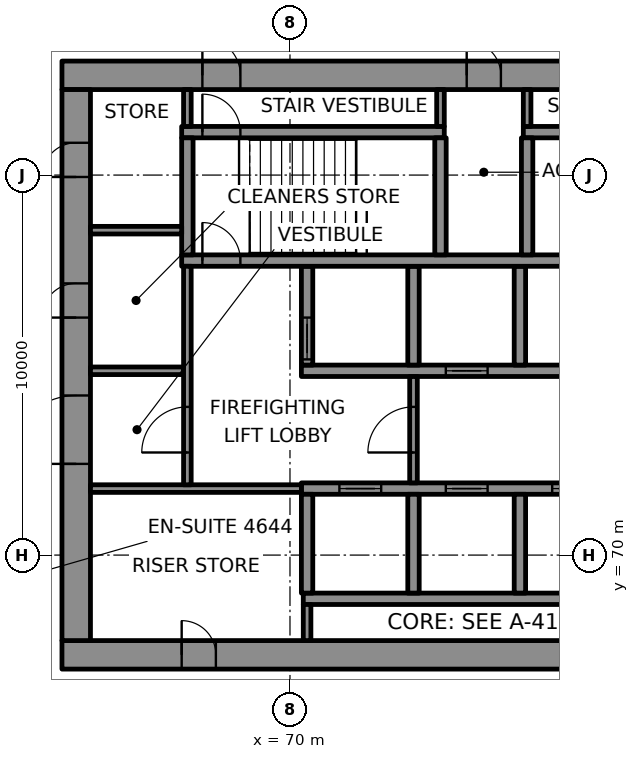
"""IFC4 building model, lengths in metres.
Left out: names, types, materials, properties, quantities, classifications, styles, units other than length and angle.
Written with IfcOpenShell. Run it as: python <this file> out.ifc"""

import sys

from ifc_helpers import new_model, si_unit, direction, frame, frame_2d, origin, place, context, subcontext, project, spatial, rectangle, extrude, element, fill, save


model = new_model("IFC4")
c1 = context("Model", 3, precision=1e-05, world=origin(), true_north=direction((0.0, 1.0)))
c2 = subcontext(c1, "Body", "Model", "MODEL_VIEW")
j1 = project(units=[si_unit("LENGTHUNIT", "METRE"), si_unit("PLANEANGLEUNIT", "RADIAN")], contexts=[c1])
p1 = place(None, origin())
s1 = spatial("IfcSite", under=j1, at=p1, CompositionType="ELEMENT")
p2 = place(p1, origin())
s2 = spatial("IfcBuilding", under=s1, at=p2, CompositionType="ELEMENT")
p3 = place(p2, frame((0.0, 0.0, 198.7)))
s3 = spatial("IfcBuildingStorey", under=s2, at=p3, CompositionType="ELEMENT", Elevation=198.7)
p4 = place(p3, frame((64.0, 67.375, 0.0), z_axis=(0.0, 0.0, 1.0), x_axis=(1.0, 0.0, 0.0)))
e1 = element("IfcWall", 1, at=p4, inside=s3, PredefinedType="SHEAR", context=c2, shape_type="SweptSolid", body=[
    extrude(rectangle(XDim=22.0, YDim=0.75, at=frame_2d((11.0, 0.0))), origin(), (0.0, 0.0, 1.0), 3.7),
])
p5 = place(p4, frame((3.15, 0.0, 0.0)))
e2 = element("IfcOpeningElement", 2, at=p5, cuts=e1, PredefinedType="OPENING", context=c2, shape_type="SweptSolid", body=[
    extrude(rectangle(XDim=0.9, YDim=2.1, at=frame_2d((0.45, 1.05))), frame((0.0, 0.385, 0.0), z_axis=(0.0, -1.0, 0.0), x_axis=(1.0, 0.0, 0.0)), (0.0, 0.0, 1.0), 0.77),
])
p6 = place(p3, frame((64.0, 82.625, 0.0), z_axis=(0.0, 0.0, 1.0), x_axis=(1.0, 0.0, 0.0)))
e3 = element("IfcWall", 3, at=p6, inside=s3, PredefinedType="SHEAR", context=c2, shape_type="SweptSolid", body=[
    extrude(rectangle(XDim=22.0, YDim=0.75, at=frame_2d((11.0, 0.0))), origin(), (0.0, 0.0, 1.0), 3.7),
])
p7 = place(p6, frame((3.695, 0.0, 0.0)))
e4 = element("IfcOpeningElement", 4, at=p7, cuts=e3, PredefinedType="OPENING", context=c2, shape_type="SweptSolid", body=[
    extrude(rectangle(XDim=1.0, YDim=2.1, at=frame_2d((0.5, 1.05))), frame((0.0, 0.385, 0.0), z_axis=(0.0, -1.0, 0.0), x_axis=(1.0, 0.0, 0.0)), (0.0, 0.0, 1.0), 0.77),
])
p8 = place(p6, frame((17.505, 0.0, 0.0)))
e5 = element("IfcOpeningElement", 5, at=p8, cuts=e3, PredefinedType="OPENING", context=c2, shape_type="SweptSolid", body=[
    extrude(rectangle(XDim=1.0, YDim=2.1, at=frame_2d((0.5, 1.05))), frame((0.0, 0.385, 0.0), z_axis=(0.0, -1.0, 0.0), x_axis=(1.0, 0.0, 0.0)), (0.0, 0.0, 1.0), 0.77),
])
p9 = place(p6, frame((10.65, 0.0, 0.0)))
e6 = element("IfcOpeningElement", 6, at=p9, cuts=e3, PredefinedType="OPENING", context=c2, shape_type="SweptSolid", body=[
    extrude(rectangle(XDim=0.9, YDim=2.1, at=frame_2d((0.45, 1.05))), frame((0.0, 0.385, 0.0), z_axis=(0.0, -1.0, 0.0), x_axis=(1.0, 0.0, 0.0)), (0.0, 0.0, 1.0), 0.77),
])
p10 = place(p3, frame((64.375, 67.75, 0.0), z_axis=(0.0, 0.0, 1.0), x_axis=(0.0, 1.0, 0.0)))
e7 = element("IfcWall", 7, at=p10, inside=s3, PredefinedType="SHEAR", context=c2, shape_type="SweptSolid", body=[
    extrude(rectangle(XDim=14.5, YDim=0.75, at=frame_2d((7.25, 0.0))), origin(), (0.0, 0.0, 1.0), 3.7),
])
p11 = place(p10, frame((4.65, 0.0, 0.0)))
e8 = element("IfcOpeningElement", 8, at=p11, cuts=e7, PredefinedType="OPENING", context=c2, shape_type="SweptSolid", body=[
    extrude(rectangle(XDim=1.8, YDim=2.1, at=frame_2d((0.9, 1.05))), frame((0.0, 0.385, 0.0), z_axis=(0.0, -1.0, 0.0), x_axis=(1.0, 0.0, 0.0)), (0.0, 0.0, 1.0), 0.77),
])
p12 = place(p10, frame((8.5, 0.0, 0.0)))
e9 = element("IfcOpeningElement", 9, at=p12, cuts=e7, PredefinedType="OPENING", context=c2, shape_type="SweptSolid", body=[
    extrude(rectangle(XDim=0.9, YDim=2.1, at=frame_2d((0.45, 1.05))), frame((0.0, 0.385, 0.0), z_axis=(0.0, -1.0, 0.0), x_axis=(1.0, 0.0, 0.0)), (0.0, 0.0, 1.0), 0.77),
])
p13 = place(p10, frame((12.2, 0.0, 0.0)))
e10 = element("IfcOpeningElement", 10, at=p13, cuts=e7, PredefinedType="OPENING", context=c2, shape_type="SweptSolid", body=[
    extrude(rectangle(XDim=0.9, YDim=2.1, at=frame_2d((0.45, 1.05))), frame((0.0, 0.385, 0.0), z_axis=(0.0, -1.0, 0.0), x_axis=(1.0, 0.0, 0.0)), (0.0, 0.0, 1.0), 0.77),
])
p14 = place(p3, frame((70.35, 68.85, 0.0), z_axis=(0.0, 0.0, 1.0), x_axis=(1.0, 0.0, 0.0)))
e11 = element("IfcWall", 11, at=p14, inside=s3, PredefinedType="SHEAR", context=c2, shape_type="SweptSolid", body=[
    extrude(rectangle(XDim=14.2, YDim=0.3, at=frame_2d((7.1, 0.0))), origin(), (0.0, 0.0, 1.0), 3.7),
])
p15 = place(p3, frame((70.3, 71.75, 0.0), z_axis=(0.0, 0.0, 1.0), x_axis=(1.0, 0.0, 0.0)))
e12 = element("IfcWall", 12, at=p15, inside=s3, PredefinedType="SHEAR", context=c2, shape_type="SweptSolid", body=[
    extrude(rectangle(XDim=14.3, YDim=0.3, at=frame_2d((7.15, 0.0))), origin(), (0.0, 0.0, 1.0), 3.7),
])
p16 = place(p15, frame((1.0, 0.0, 0.0)))
e13 = element("IfcOpeningElement", 13, at=p16, cuts=e12, PredefinedType="OPENING", context=c2, shape_type="SweptSolid", body=[
    extrude(rectangle(XDim=1.1, YDim=2.1, at=frame_2d((0.55, 1.05))), frame((0.0, 0.16, 0.0), z_axis=(0.0, -1.0, 0.0), x_axis=(1.0, 0.0, 0.0)), (0.0, 0.0, 1.0), 0.32),
])
p17 = place(p15, frame((3.8, 0.0, 0.0)))
e14 = element("IfcOpeningElement", 14, at=p17, cuts=e12, PredefinedType="OPENING", context=c2, shape_type="SweptSolid", body=[
    extrude(rectangle(XDim=1.1, YDim=2.1, at=frame_2d((0.55, 1.05))), frame((0.0, 0.16, 0.0), z_axis=(0.0, -1.0, 0.0), x_axis=(1.0, 0.0, 0.0)), (0.0, 0.0, 1.0), 0.32),
])
p18 = place(p15, frame((6.6, 0.0, 0.0)))
e15 = element("IfcOpeningElement", 15, at=p18, cuts=e12, PredefinedType="OPENING", context=c2, shape_type="SweptSolid", body=[
    extrude(rectangle(XDim=1.1, YDim=2.1, at=frame_2d((0.55, 1.05))), frame((0.0, 0.16, 0.0), z_axis=(0.0, -1.0, 0.0), x_axis=(1.0, 0.0, 0.0)), (0.0, 0.0, 1.0), 0.32),
])
p19 = place(p15, frame((9.4, 0.0, 0.0)))
e16 = element("IfcOpeningElement", 16, at=p19, cuts=e12, PredefinedType="OPENING", context=c2, shape_type="SweptSolid", body=[
    extrude(rectangle(XDim=1.1, YDim=2.1, at=frame_2d((0.55, 1.05))), frame((0.0, 0.16, 0.0), z_axis=(0.0, -1.0, 0.0), x_axis=(1.0, 0.0, 0.0)), (0.0, 0.0, 1.0), 0.32),
])
p20 = place(p15, frame((12.2, 0.0, 0.0)))
e17 = element("IfcOpeningElement", 17, at=p20, cuts=e12, PredefinedType="OPENING", context=c2, shape_type="SweptSolid", body=[
    extrude(rectangle(XDim=1.1, YDim=2.1, at=frame_2d((0.55, 1.05))), frame((0.0, 0.16, 0.0), z_axis=(0.0, -1.0, 0.0), x_axis=(1.0, 0.0, 0.0)), (0.0, 0.0, 1.0), 0.32),
])
p21 = place(p3, frame((70.3, 74.85, 0.0), z_axis=(0.0, 0.0, 1.0), x_axis=(1.0, 0.0, 0.0)))
e18 = element("IfcWall", 18, at=p21, inside=s3, PredefinedType="SHEAR", context=c2, shape_type="SweptSolid", body=[
    extrude(rectangle(XDim=14.3, YDim=0.3, at=frame_2d((7.15, 0.0))), origin(), (0.0, 0.0, 1.0), 3.7),
])
p22 = place(p21, frame((3.8, 0.0, 0.0)))
e19 = element("IfcOpeningElement", 19, at=p22, cuts=e18, PredefinedType="OPENING", context=c2, shape_type="SweptSolid", body=[
    extrude(rectangle(XDim=1.1, YDim=2.1, at=frame_2d((0.55, 1.05))), frame((0.0, 0.16, 0.0), z_axis=(0.0, -1.0, 0.0), x_axis=(1.0, 0.0, 0.0)), (0.0, 0.0, 1.0), 0.32),
])
p23 = place(p21, frame((12.2, 0.0, 0.0)))
e20 = element("IfcOpeningElement", 20, at=p23, cuts=e18, PredefinedType="OPENING", context=c2, shape_type="SweptSolid", body=[
    extrude(rectangle(XDim=1.1, YDim=2.1, at=frame_2d((0.55, 1.05))), frame((0.0, 0.16, 0.0), z_axis=(0.0, -1.0, 0.0), x_axis=(1.0, 0.0, 0.0)), (0.0, 0.0, 1.0), 0.32),
])
p24 = place(p3, frame((70.45, 69.0, 0.0), z_axis=(0.0, 0.0, 1.0), x_axis=(0.0, 1.0, 0.0)))
e21 = element("IfcWall", 21, at=p24, inside=s3, PredefinedType="SHEAR", context=c2, shape_type="SweptSolid", body=[
    extrude(rectangle(XDim=2.6, YDim=0.3, at=frame_2d((1.3, 0.0))), origin(), (0.0, 0.0, 1.0), 3.7),
])
p25 = place(p3, frame((70.45, 75.0, 0.0), z_axis=(0.0, 0.0, 1.0), x_axis=(0.0, 1.0, 0.0)))
e22 = element("IfcWall", 22, at=p25, inside=s3, PredefinedType="SHEAR", context=c2, shape_type="SweptSolid", body=[
    extrude(rectangle(XDim=2.6, YDim=0.3, at=frame_2d((1.3, 0.0))), origin(), (0.0, 0.0, 1.0), 3.7),
])
p26 = place(p25, frame((0.15, 0.0, 0.0)))
e23 = element("IfcOpeningElement", 23, at=p26, cuts=e22, PredefinedType="OPENING", context=c2, shape_type="SweptSolid", body=[
    extrude(rectangle(XDim=1.1, YDim=2.1, at=frame_2d((0.55, 1.05))), frame((0.0, 0.16, 0.0), z_axis=(0.0, -1.0, 0.0), x_axis=(1.0, 0.0, 0.0)), (0.0, 0.0, 1.0), 0.32),
])
for number, where, z_axis, x_axis in (
    (24, (73.25, 69.0, 0.0), (0.0, 0.0, 1.0), (0.0, 1.0, 0.0)),
    (25, (73.25, 75.0, 0.0), (0.0, 0.0, 1.0), (0.0, 1.0, 0.0)),
    (26, (76.05, 69.0, 0.0), (0.0, 0.0, 1.0), (0.0, 1.0, 0.0)),
    (27, (76.05, 75.0, 0.0), (0.0, 0.0, 1.0), (0.0, 1.0, 0.0)),
):
    element("IfcWall", number, at=place(p3, frame(where, z_axis=z_axis, x_axis=x_axis)), inside=s3, PredefinedType="SHEAR", context=c2, shape_type="SweptSolid", body=[
        extrude(rectangle(XDim=2.6, YDim=0.3, at=frame_2d((1.3, 0.0))), origin(), (0.0, 0.0, 1.0), 3.7),
    ])
p27 = place(p3, frame((67.15, 77.75, 0.0), z_axis=(0.0, 0.0, 1.0), x_axis=(1.0, 0.0, 0.0)))
e28 = element("IfcWall", 28, at=p27, inside=s3, PredefinedType="SHEAR", context=c2, shape_type="SweptSolid", body=[
    extrude(rectangle(XDim=17.45, YDim=0.3, at=frame_2d((8.725, 0.0))), origin(), (0.0, 0.0, 1.0), 3.7),
])
p28 = place(p27, frame((0.545, 0.0, 0.0)))
e29 = element("IfcOpeningElement", 29, at=p28, cuts=e28, PredefinedType="OPENING", context=c2, shape_type="SweptSolid", body=[
    extrude(rectangle(XDim=1.0, YDim=2.1, at=frame_2d((0.5, 1.05))), frame((0.0, 0.16, 0.0), z_axis=(0.0, -1.0, 0.0), x_axis=(1.0, 0.0, 0.0)), (0.0, 0.0, 1.0), 0.32),
])
p29 = place(p3, frame((67.15, 81.13, 0.0), z_axis=(0.0, 0.0, 1.0), x_axis=(1.0, 0.0, 0.0)))
e30 = element("IfcWall", 30, at=p29, inside=s3, PredefinedType="SHEAR", context=c2, shape_type="SweptSolid", body=[
    extrude(rectangle(XDim=6.91, YDim=0.3, at=frame_2d((3.455, 0.0))), origin(), (0.0, 0.0, 1.0), 3.7),
])
p30 = place(p29, frame((0.545, 0.0, 0.0)))
e31 = element("IfcOpeningElement", 31, at=p30, cuts=e30, PredefinedType="OPENING", context=c2, shape_type="SweptSolid", body=[
    extrude(rectangle(XDim=1.0, YDim=2.1, at=frame_2d((0.5, 1.05))), frame((0.0, 0.16, 0.0), z_axis=(0.0, -1.0, 0.0), x_axis=(1.0, 0.0, 0.0)), (0.0, 0.0, 1.0), 0.32),
])
p31 = place(p3, frame((76.14, 81.13, 0.0), z_axis=(0.0, 0.0, 1.0), x_axis=(1.0, 0.0, 0.0)))
e32 = element("IfcWall", 32, at=p31, inside=s3, PredefinedType="SHEAR", context=c2, shape_type="SweptSolid", body=[
    extrude(rectangle(XDim=6.86, YDim=0.3, at=frame_2d((3.43, 0.0))), origin(), (0.0, 0.0, 1.0), 3.7),
])
p32 = place(p31, frame((5.365, 0.0, 0.0)))
e33 = element("IfcOpeningElement", 33, at=p32, cuts=e32, PredefinedType="OPENING", context=c2, shape_type="SweptSolid", body=[
    extrude(rectangle(XDim=1.0, YDim=2.1, at=frame_2d((0.5, 1.05))), frame((0.0, 0.16, 0.0), z_axis=(0.0, -1.0, 0.0), x_axis=(1.0, 0.0, 0.0)), (0.0, 0.0, 1.0), 0.32),
])
for number, where, z_axis, x_axis in (
    (34, (67.3, 77.9, 0.0), (0.0, 0.0, 1.0), (0.0, 1.0, 0.0)),
    (35, (73.96, 77.9, 0.0), (0.0, 0.0, 1.0), (0.0, 1.0, 0.0)),
    (36, (76.24, 77.9, 0.0), (0.0, 0.0, 1.0), (0.0, 1.0, 0.0)),
):
    element("IfcWall", number, at=place(p3, frame(where, z_axis=z_axis, x_axis=x_axis)), inside=s3, PredefinedType="SHEAR", context=c2, shape_type="SweptSolid", body=[
        extrude(rectangle(XDim=3.08, YDim=0.3, at=frame_2d((1.54, 0.0))), origin(), (0.0, 0.0, 1.0), 3.7),
    ])
p33 = place(p3, frame((64.75, 71.75, 0.0), z_axis=(0.0, 0.0, 1.0), x_axis=(1.0, 0.0, 0.0)))
e37 = element("IfcWall", 37, at=p33, inside=s3, PredefinedType="PARTITIONING", context=c2, shape_type="SweptSolid", body=[
    extrude(rectangle(XDim=5.55, YDim=0.2, at=frame_2d((2.775, 0.0))), origin(), (0.0, 0.0, 1.0), 3.7),
])
p34 = place(p3, frame((64.75, 74.85, 0.0), z_axis=(0.0, 0.0, 1.0), x_axis=(1.0, 0.0, 0.0)))
e38 = element("IfcWall", 38, at=p34, inside=s3, PredefinedType="PARTITIONING", context=c2, shape_type="SweptSolid", body=[
    extrude(rectangle(XDim=2.45, YDim=0.2, at=frame_2d((1.225, 0.0))), origin(), (0.0, 0.0, 1.0), 3.7),
])
p35 = place(p3, frame((64.75, 78.55, 0.0), z_axis=(0.0, 0.0, 1.0), x_axis=(1.0, 0.0, 0.0)))
e39 = element("IfcWall", 39, at=p35, inside=s3, PredefinedType="PARTITIONING", context=c2, shape_type="SweptSolid", body=[
    extrude(rectangle(XDim=2.4, YDim=0.2, at=frame_2d((1.2, 0.0))), origin(), (0.0, 0.0, 1.0), 3.7),
])
p36 = place(p3, frame((67.3, 71.85, 0.0), z_axis=(0.0, 0.0, 1.0), x_axis=(0.0, 1.0, 0.0)))
e40 = element("IfcWall", 40, at=p36, inside=s3, PredefinedType="PARTITIONING", context=c2, shape_type="SweptSolid", body=[
    extrude(rectangle(XDim=5.75, YDim=0.2, at=frame_2d((2.875, 0.0))), origin(), (0.0, 0.0, 1.0), 3.7),
])
p37 = place(p36, frame((0.85, 0.0, 0.0)))
e41 = element("IfcOpeningElement", 41, at=p37, cuts=e40, PredefinedType="OPENING", context=c2, shape_type="SweptSolid", body=[
    extrude(rectangle(XDim=1.2, YDim=2.1, at=frame_2d((0.6, 1.05))), frame((0.0, 0.11, 0.0), z_axis=(0.0, -1.0, 0.0), x_axis=(1.0, 0.0, 0.0)), (0.0, 0.0, 1.0), 0.22),
])
p38 = place(p3, frame((67.3, 81.28, 0.0), z_axis=(0.0, 0.0, 1.0), x_axis=(0.0, 1.0, 0.0)))
e42 = element("IfcWall", 42, at=p38, inside=s3, PredefinedType="PARTITIONING", context=c2, shape_type="SweptSolid", body=[
    extrude(rectangle(XDim=0.97, YDim=0.2, at=frame_2d((0.485, 0.0))), origin(), (0.0, 0.0, 1.0), 3.7),
])
p39 = place(p3, frame((70.45, 67.75, 0.0), z_axis=(0.0, 0.0, 1.0), x_axis=(0.0, 1.0, 0.0)))
e43 = element("IfcWall", 43, at=p39, inside=s3, PredefinedType="PARTITIONING", context=c2, shape_type="SweptSolid", body=[
    extrude(rectangle(XDim=0.95, YDim=0.2, at=frame_2d((0.475, 0.0))), origin(), (0.0, 0.0, 1.0), 3.7),
])
p40 = place(p3, frame((73.25, 71.9, 0.0), z_axis=(0.0, 0.0, 1.0), x_axis=(0.0, 1.0, 0.0)))
e44 = element("IfcWall", 44, at=p40, inside=s3, PredefinedType="PARTITIONING", context=c2, shape_type="SweptSolid", body=[
    extrude(rectangle(XDim=2.8, YDim=0.2, at=frame_2d((1.4, 0.0))), origin(), (0.0, 0.0, 1.0), 3.7),
])
p41 = place(p40, frame((0.8, 0.0, 0.0)))
e45 = element("IfcOpeningElement", 45, at=p41, cuts=e44, PredefinedType="OPENING", context=c2, shape_type="SweptSolid", body=[
    extrude(rectangle(XDim=1.2, YDim=2.1, at=frame_2d((0.6, 1.05))), frame((0.0, 0.11, 0.0), z_axis=(0.0, -1.0, 0.0), x_axis=(1.0, 0.0, 0.0)), (0.0, 0.0, 1.0), 0.22),
])
for number, where, z_axis, x_axis in (
    (46, (73.96, 81.28, 0.0), (0.0, 0.0, 1.0), (0.0, 1.0, 0.0)),
    (47, (76.24, 81.28, 0.0), (0.0, 0.0, 1.0), (0.0, 1.0, 0.0)),
):
    element("IfcWall", number, at=place(p3, frame(where, z_axis=z_axis, x_axis=x_axis)), inside=s3, PredefinedType="PARTITIONING", context=c2, shape_type="SweptSolid", body=[
        extrude(rectangle(XDim=0.97, YDim=0.2, at=frame_2d((0.485, 0.0))), origin(), (0.0, 0.0, 1.0), 3.7),
    ])
p42 = place(p16, origin())
e48 = element("IfcDoor", 48, at=p42, inside=s3, OperationType="DOUBLE_DOOR_SLIDING", PredefinedType="DOOR", context=c2, shape_type="SweptSolid", body=[
    extrude(rectangle(XDim=1.1, YDim=2.1, at=frame_2d((0.55, 1.05))), frame((0.0, 0.025, 0.0), z_axis=(0.0, -1.0, 0.0), x_axis=(1.0, 0.0, 0.0)), (0.0, 0.0, 1.0), 0.05),
])
fill(e13, e48)
p43 = place(p17, origin())
e49 = element("IfcDoor", 49, at=p43, inside=s3, OperationType="DOUBLE_DOOR_SLIDING", PredefinedType="DOOR", context=c2, shape_type="SweptSolid", body=[
    extrude(rectangle(XDim=1.1, YDim=2.1, at=frame_2d((0.55, 1.05))), frame((0.0, 0.025, 0.0), z_axis=(0.0, -1.0, 0.0), x_axis=(1.0, 0.0, 0.0)), (0.0, 0.0, 1.0), 0.05),
])
fill(e14, e49)
p44 = place(p18, origin())
e50 = element("IfcDoor", 50, at=p44, inside=s3, OperationType="DOUBLE_DOOR_SLIDING", PredefinedType="DOOR", context=c2, shape_type="SweptSolid", body=[
    extrude(rectangle(XDim=1.1, YDim=2.1, at=frame_2d((0.55, 1.05))), frame((0.0, 0.025, 0.0), z_axis=(0.0, -1.0, 0.0), x_axis=(1.0, 0.0, 0.0)), (0.0, 0.0, 1.0), 0.05),
])
fill(e15, e50)
p45 = place(p26, origin())
e51 = element("IfcDoor", 51, at=p45, inside=s3, OperationType="DOUBLE_DOOR_SLIDING", PredefinedType="DOOR", context=c2, shape_type="SweptSolid", body=[
    extrude(rectangle(XDim=1.1, YDim=2.1, at=frame_2d((0.55, 1.05))), frame((0.0, 0.025, 0.0), z_axis=(0.0, -1.0, 0.0), x_axis=(1.0, 0.0, 0.0)), (0.0, 0.0, 1.0), 0.05),
])
fill(e23, e51)
p46 = place(p22, origin())
e52 = element("IfcDoor", 52, at=p46, inside=s3, OperationType="DOUBLE_DOOR_SLIDING", PredefinedType="DOOR", context=c2, shape_type="SweptSolid", body=[
    extrude(rectangle(XDim=1.1, YDim=2.1, at=frame_2d((0.55, 1.05))), frame((0.0, 0.025, 0.0), z_axis=(0.0, -1.0, 0.0), x_axis=(1.0, 0.0, 0.0)), (0.0, 0.0, 1.0), 0.05),
])
fill(e19, e52)
p47 = place(p28, origin())
e53 = element("IfcDoor", 53, at=p47, inside=s3, OperationType="SINGLE_SWING_LEFT", PredefinedType="DOOR", context=c2, shape_type="SweptSolid", body=[
    extrude(rectangle(XDim=1.0, YDim=2.1, at=frame_2d((0.5, 1.05))), frame((0.0, 0.025, 0.0), z_axis=(0.0, -1.0, 0.0), x_axis=(1.0, 0.0, 0.0)), (0.0, 0.0, 1.0), 0.05),
])
fill(e29, e53)
p48 = place(p30, origin())
e54 = element("IfcDoor", 54, at=p48, inside=s3, OperationType="SINGLE_SWING_RIGHT", PredefinedType="DOOR", context=c2, shape_type="SweptSolid", body=[
    extrude(rectangle(XDim=1.0, YDim=2.1, at=frame_2d((0.5, 1.05))), frame((0.0, 0.025, 0.0), z_axis=(0.0, -1.0, 0.0), x_axis=(1.0, 0.0, 0.0)), (0.0, 0.0, 1.0), 0.05),
])
fill(e31, e54)
p49 = place(p7, origin())
e55 = element("IfcDoor", 55, at=p49, inside=s3, OperationType="SINGLE_SWING_LEFT", PredefinedType="DOOR", context=c2, shape_type="SweptSolid", body=[
    extrude(rectangle(XDim=1.0, YDim=2.1, at=frame_2d((0.5, 1.05))), frame((0.0, 0.095, 0.0), z_axis=(0.0, -1.0, 0.0), x_axis=(1.0, 0.0, 0.0)), (0.0, 0.0, 1.0), 0.19),
])
fill(e4, e55)
p50 = place(p41, origin())
e56 = element("IfcDoor", 56, at=p50, inside=s3, OperationType="SINGLE_SWING_LEFT", PredefinedType="DOOR", context=c2, shape_type="SweptSolid", body=[
    extrude(rectangle(XDim=1.2, YDim=2.1, at=frame_2d((0.6, 1.05))), frame((0.0, 0.025, 0.0), z_axis=(0.0, -1.0, 0.0), x_axis=(1.0, 0.0, 0.0)), (0.0, 0.0, 1.0), 0.05),
])
fill(e45, e56)
p51 = place(p37, origin())
e57 = element("IfcDoor", 57, at=p51, inside=s3, OperationType="SINGLE_SWING_RIGHT", PredefinedType="DOOR", context=c2, shape_type="SweptSolid", body=[
    extrude(rectangle(XDim=1.2, YDim=2.1, at=frame_2d((0.6, 1.05))), frame((0.0, 0.025, 0.0), z_axis=(0.0, -1.0, 0.0), x_axis=(1.0, 0.0, 0.0)), (0.0, 0.0, 1.0), 0.05),
])
fill(e41, e57)
p52 = place(p11, origin())
e58 = element("IfcDoor", 58, at=p52, inside=s3, OperationType="SINGLE_SWING_LEFT", PredefinedType="DOOR", context=c2, shape_type="SweptSolid", body=[
    extrude(rectangle(XDim=1.8, YDim=2.1, at=frame_2d((0.9, 1.05))), frame((0.0, 0.095, 0.0), z_axis=(0.0, -1.0, 0.0), x_axis=(1.0, 0.0, 0.0)), (0.0, 0.0, 1.0), 0.19),
])
fill(e8, e58)
p53 = place(p5, origin())
e59 = element("IfcDoor", 59, at=p53, inside=s3, OperationType="SINGLE_SWING_LEFT", PredefinedType="DOOR", context=c2, shape_type="SweptSolid", body=[
    extrude(rectangle(XDim=0.9, YDim=2.1, at=frame_2d((0.45, 1.05))), frame((0.0, 0.095, 0.0), z_axis=(0.0, -1.0, 0.0), x_axis=(1.0, 0.0, 0.0)), (0.0, 0.0, 1.0), 0.19),
])
fill(e2, e59)
p54 = place(p12, origin())
e60 = element("IfcDoor", 60, at=p54, inside=s3, OperationType="SINGLE_SWING_RIGHT", PredefinedType="DOOR", context=c2, shape_type="SweptSolid", body=[
    extrude(rectangle(XDim=0.9, YDim=2.1, at=frame_2d((0.45, 1.05))), frame((0.0, 0.095, 0.0), z_axis=(0.0, -1.0, 0.0), x_axis=(1.0, 0.0, 0.0)), (0.0, 0.0, 1.0), 0.19),
])
fill(e9, e60)
p55 = place(p13, origin())
e61 = element("IfcDoor", 61, at=p55, inside=s3, OperationType="SINGLE_SWING_LEFT", PredefinedType="DOOR", context=c2, shape_type="SweptSolid", body=[
    extrude(rectangle(XDim=0.9, YDim=2.1, at=frame_2d((0.45, 1.05))), frame((0.0, 0.095, 0.0), z_axis=(0.0, -1.0, 0.0), x_axis=(1.0, 0.0, 0.0)), (0.0, 0.0, 1.0), 0.19),
])
fill(e10, e61)
p56 = place(p9, origin())
e62 = element("IfcDoor", 62, at=p56, inside=s3, OperationType="SINGLE_SWING_RIGHT", PredefinedType="DOOR", context=c2, shape_type="SweptSolid", body=[
    extrude(rectangle(XDim=0.9, YDim=2.1, at=frame_2d((0.45, 1.05))), frame((0.0, 0.095, 0.0), z_axis=(0.0, -1.0, 0.0), x_axis=(1.0, 0.0, 0.0)), (0.0, 0.0, 1.0), 0.19),
])
fill(e6, e62)
save(model, sys.argv[1])
